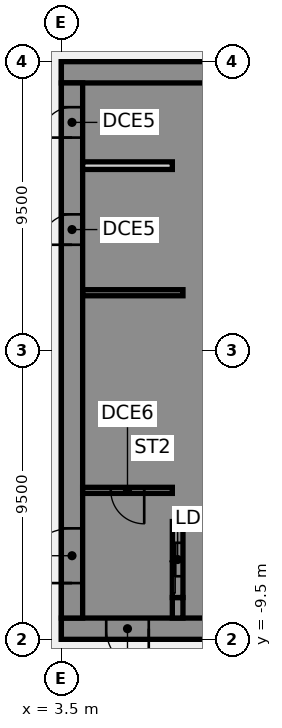
"""IFC4 building model, lengths in metres.
Left out: names, types, materials, properties, quantities, classifications, styles, units other than length and angle.
Written with IfcOpenShell. Run it as: python <this file> out.ifc"""

import sys

from ifc_helpers import new_model, si_unit, direction, frame, frame_2d, origin, place, context, subcontext, project, spatial, polyline, rectangle, outline, extrude, element, fill, save


model = new_model("IFC4")
c1 = context("Model", 3, precision=1e-05, world=origin(), true_north=direction((0.0, 1.0)))
c2 = subcontext(c1, "Body", "Model", "MODEL_VIEW")
j1 = project(units=[si_unit("LENGTHUNIT", "METRE"), si_unit("PLANEANGLEUNIT", "RADIAN")], contexts=[c1])
p1 = place(None, origin())
s1 = spatial("IfcSite", under=j1, at=p1, CompositionType="ELEMENT")
p2 = place(p1, origin())
s2 = spatial("IfcBuilding", under=s1, at=p2, CompositionType="ELEMENT")
p3 = place(p2, frame((0.0, 0.0, 52.75)))
s3 = spatial("IfcBuildingStorey", under=s2, at=p3, CompositionType="ELEMENT", Elevation=52.75)
p4 = place(p3, frame((16.5, -9.15, 0.0), z_axis=(0.0, 0.0, 1.0), x_axis=(-1.0, 0.0, 0.0)))
e1 = element("IfcWall", 1, at=p4, inside=s3, PredefinedType="SHEAR", context=c2, shape_type="SweptSolid", body=[
    extrude(rectangle(XDim=13.0, YDim=0.7, at=frame_2d((6.5, 0.0))), origin(), (0.0, 0.0, 1.0), 3.61),
])
p5 = place(p4, frame((4.15, 0.0, 0.0)))
e2 = element("IfcOpeningElement", 2, at=p5, cuts=e1, PredefinedType="OPENING", context=c2, shape_type="SweptSolid", body=[
    extrude(rectangle(XDim=1.4, YDim=2.1, at=frame_2d((0.7, 1.05))), frame((0.0, 0.36, 0.0), z_axis=(0.0, -1.0, 0.0), x_axis=(1.0, 0.0, 0.0)), (0.0, 0.0, 1.0), 0.72),
])
p6 = place(p4, frame((10.125, 0.0, 0.0)))
e3 = element("IfcOpeningElement", 3, at=p6, cuts=e1, PredefinedType="OPENING", context=c2, shape_type="SweptSolid", body=[
    extrude(rectangle(XDim=1.4, YDim=2.1, at=frame_2d((0.7, 1.05))), frame((0.0, 0.36, 0.0), z_axis=(0.0, -1.0, 0.0), x_axis=(1.0, 0.0, 0.0)), (0.0, 0.0, 1.0), 0.72),
])
p7 = place(p3, frame((16.5, 9.15, 0.0), z_axis=(0.0, 0.0, 1.0), x_axis=(-1.0, 0.0, 0.0)))
e4 = element("IfcWall", 4, at=p7, inside=s3, PredefinedType="SHEAR", context=c2, shape_type="SweptSolid", body=[
    extrude(rectangle(XDim=13.0, YDim=0.7, at=frame_2d((6.5, 0.0))), origin(), (0.0, 0.0, 1.0), 3.61),
])
p8 = place(p3, origin())
e5 = element("IfcWall", 5, at=p8, inside=s3, PredefinedType="SHEAR", context=c2, shape_type="SweptSolid", body=[
    extrude(outline(polyline([(9.8, -5.375), (7.5, -5.375), (7.5, -2.875), (9.8, -2.875), (9.8, -2.625), (7.5, -2.625), (7.5, -0.125), (9.8, -0.125), (9.8, 0.125), (7.5, 0.125), (7.5, 2.625), (9.8, 2.625), (9.8, 2.875), (7.5, 2.875), (7.5, 5.375), (9.8, 5.375), (9.8, 5.625), (7.5, 5.625), (7.5, 8.125), (9.8, 8.125), (9.8, 8.8), (7.5, 8.8), (7.15, 8.8), (7.15, -5.625), (7.5, -5.625), (9.8, -5.625), (9.8, -5.375)])), origin(), (0.0, 0.0, 1.0), 3.61),
])
p9 = place(p3, origin())
e6 = element("IfcWall", 6, at=p9, inside=s3, PredefinedType="SHEAR", context=c2, shape_type="SweptSolid", body=[
    extrude(outline(polyline([(7.5, -8.125), (7.5, -8.8), (9.8, -8.8), (9.8, -8.125), (9.8, -5.625), (9.55, -5.625), (9.55, -8.125), (7.5, -8.125)])), origin(), (0.0, 0.0, 1.0), 3.61),
])
p10 = place(p3, frame((7.325, -8.8, 0.0), z_axis=(0.0, 0.0, 1.0), x_axis=(0.0, 1.0, 0.0)))
e7 = element("IfcWall", 7, at=p10, inside=s3, PredefinedType="SHEAR", context=c2, shape_type="SweptSolid", body=[
    extrude(rectangle(XDim=0.675, YDim=0.35, at=frame_2d((0.337, 0.0))), origin(), (0.0, 0.0, 1.0), 3.61),
])
p11 = place(p3, frame((7.5, 1.9, 0.0), z_axis=(0.0, 0.0, 1.0), x_axis=(-1.0, 0.0, 0.0)))
e8 = element("IfcWall", 8, at=p11, inside=s3, PredefinedType="SHEAR", context=c2, shape_type="SweptSolid", body=[
    extrude(rectangle(XDim=3.3, YDim=0.2, at=frame_2d((1.65, 0.0))), origin(), (0.0, 0.0, 1.0), 3.61),
])
p12 = place(p3, frame((7.325, -8.125, 0.0), z_axis=(0.0, 0.0, 1.0), x_axis=(0.0, 1.0, 0.0)))
e9 = element("IfcWall", 9, at=p12, inside=s3, PredefinedType="SHEAR", context=c2, shape_type="SweptSolid", body=[
    extrude(rectangle(XDim=2.5, YDim=0.35, at=frame_2d((1.25, 0.0))), origin(), (0.0, 0.0, 1.0), 3.61),
])
p13 = place(p12, frame((0.7, 0.0, 0.0)))
e10 = element("IfcOpeningElement", 10, at=p13, cuts=e9, PredefinedType="OPENING", context=c2, shape_type="SweptSolid", body=[
    extrude(rectangle(XDim=1.1, YDim=2.1, at=frame_2d((0.55, 1.05))), frame((0.0, 0.185, 0.0), z_axis=(0.0, -1.0, 0.0), x_axis=(1.0, 0.0, 0.0)), (0.0, 0.0, 1.0), 0.37),
])
p14 = place(p3, frame((3.85, -8.8, 0.0), z_axis=(0.0, 0.0, 1.0), x_axis=(0.0, 1.0, 0.0)))
e11 = element("IfcWall", 11, at=p14, inside=s3, PredefinedType="SHEAR", context=c2, shape_type="SweptSolid", body=[
    extrude(rectangle(XDim=17.6, YDim=0.7, at=frame_2d((8.8, 0.0))), origin(), (0.0, 0.0, 1.0), 3.61),
])
p15 = place(p14, frame((1.15, 0.0, 0.0)))
e12 = element("IfcOpeningElement", 12, at=p15, cuts=e11, PredefinedType="OPENING", context=c2, shape_type="SweptSolid", body=[
    extrude(rectangle(XDim=1.8, YDim=2.1, at=frame_2d((0.9, 1.05))), frame((0.0, 0.36, 0.0), z_axis=(0.0, -1.0, 0.0), x_axis=(1.0, 0.0, 0.0)), (0.0, 0.0, 1.0), 0.72),
])
p16 = place(p14, frame((12.278, 0.0, 0.0)))
e13 = element("IfcOpeningElement", 13, at=p16, cuts=e11, PredefinedType="OPENING", context=c2, shape_type="SweptSolid", body=[
    extrude(rectangle(XDim=1.0, YDim=2.1, at=frame_2d((0.5, 1.05))), frame((0.0, 0.36, 0.0), z_axis=(0.0, -1.0, 0.0), x_axis=(1.0, 0.0, 0.0)), (0.0, 0.0, 1.0), 0.72),
])
p17 = place(p14, frame((15.802, 0.0, 0.0)))
e14 = element("IfcOpeningElement", 14, at=p17, cuts=e11, PredefinedType="OPENING", context=c2, shape_type="SweptSolid", body=[
    extrude(rectangle(XDim=1.0, YDim=2.1, at=frame_2d((0.5, 1.05))), frame((0.0, 0.36, 0.0), z_axis=(0.0, -1.0, 0.0), x_axis=(1.0, 0.0, 0.0)), (0.0, 0.0, 1.0), 0.72),
])
p18 = place(p3, frame((7.15, 6.08, 0.0), z_axis=(0.0, 0.0, 1.0), x_axis=(-1.0, 0.0, 0.0)))
e15 = element("IfcWall", 15, at=p18, inside=s3, PredefinedType="PARTITIONING", context=c2, shape_type="SweptSolid", body=[
    extrude(rectangle(XDim=2.95, YDim=0.25, at=frame_2d((1.475, 0.0))), origin(), (0.0, 0.0, 1.0), 3.61),
])
p19 = place(p3, frame((7.15, -4.6, 0.0), z_axis=(0.0, 0.0, 1.0), x_axis=(-1.0, 0.0, 0.0)))
e16 = element("IfcWall", 16, at=p19, inside=s3, PredefinedType="SHEAR", context=c2, shape_type="SweptSolid", body=[
    extrude(rectangle(XDim=2.95, YDim=0.2, at=frame_2d((1.475, 0.0))), origin(), (0.0, 0.0, 1.0), 3.61),
])
p20 = place(p19, frame((0.925, 0.0, 0.0)))
e17 = element("IfcOpeningElement", 17, at=p20, cuts=e16, PredefinedType="OPENING", context=c2, shape_type="SweptSolid", body=[
    extrude(rectangle(XDim=1.1, YDim=2.1, at=frame_2d((0.55, 1.05))), frame((0.0, 0.11, 0.0), z_axis=(0.0, -1.0, 0.0), x_axis=(1.0, 0.0, 0.0)), (0.0, 0.0, 1.0), 0.22),
])
p21 = place(p6, origin())
e18 = element("IfcDoor", 18, at=p21, inside=s3, OperationType="SINGLE_SWING_LEFT", PredefinedType="DOOR", context=c2, shape_type="SweptSolid", body=[
    extrude(rectangle(XDim=1.4, YDim=2.1, at=frame_2d((0.7, 1.05))), frame((0.0, 0.025, 0.0), z_axis=(0.0, -1.0, 0.0), x_axis=(1.0, 0.0, 0.0)), (0.0, 0.0, 1.0), 0.05),
])
fill(e3, e18)
p22 = place(p15, origin())
e19 = element("IfcDoor", 19, at=p22, inside=s3, OperationType="SINGLE_SWING_LEFT", PredefinedType="DOOR", context=c2, shape_type="SweptSolid", body=[
    extrude(rectangle(XDim=1.8, YDim=2.1, at=frame_2d((0.9, 1.05))), frame((0.0, 0.025, 0.0), z_axis=(0.0, -1.0, 0.0), x_axis=(1.0, 0.0, 0.0)), (0.0, 0.0, 1.0), 0.05),
])
fill(e12, e19)
p23 = place(p16, origin())
e20 = element("IfcDoor", 20, at=p23, inside=s3, OperationType="SINGLE_SWING_LEFT", PredefinedType="DOOR", context=c2, shape_type="SweptSolid", body=[
    extrude(rectangle(XDim=1.0, YDim=2.1, at=frame_2d((0.5, 1.05))), frame((0.0, -0.275, 0.0), z_axis=(0.0, -1.0, 0.0), x_axis=(1.0, 0.0, 0.0)), (0.0, 0.0, 1.0), 0.05),
])
fill(e13, e20)
p24 = place(p17, origin())
e21 = element("IfcDoor", 21, at=p24, inside=s3, OperationType="SINGLE_SWING_LEFT", PredefinedType="DOOR", context=c2, shape_type="SweptSolid", body=[
    extrude(rectangle(XDim=1.0, YDim=2.1, at=frame_2d((0.5, 1.05))), frame((0.0, -0.275, 0.0), z_axis=(0.0, -1.0, 0.0), x_axis=(1.0, 0.0, 0.0)), (0.0, 0.0, 1.0), 0.05),
])
fill(e14, e21)
p25 = place(p20, origin())
e22 = element("IfcDoor", 22, at=p25, inside=s3, OperationType="SINGLE_SWING_LEFT", PredefinedType="DOOR", context=c2, shape_type="SweptSolid", body=[
    extrude(rectangle(XDim=1.1, YDim=2.1, at=frame_2d((0.55, 1.05))), frame((0.0, 0.025, 0.0), z_axis=(0.0, -1.0, 0.0), x_axis=(1.0, 0.0, 0.0)), (0.0, 0.0, 1.0), 0.05),
])
fill(e17, e22)
p26 = place(p13, origin())
e23 = element("IfcDoor", 23, at=p26, inside=s3, OperationType="SLIDING_TO_LEFT", PredefinedType="DOOR", context=c2, shape_type="SweptSolid", body=[
    extrude(rectangle(XDim=1.1, YDim=2.1, at=frame_2d((0.55, 1.05))), frame((0.0, 0.025, 0.0), z_axis=(0.0, -1.0, 0.0), x_axis=(1.0, 0.0, 0.0)), (0.0, 0.0, 1.0), 0.05),
])
fill(e10, e23)
save(model, sys.argv[1])
